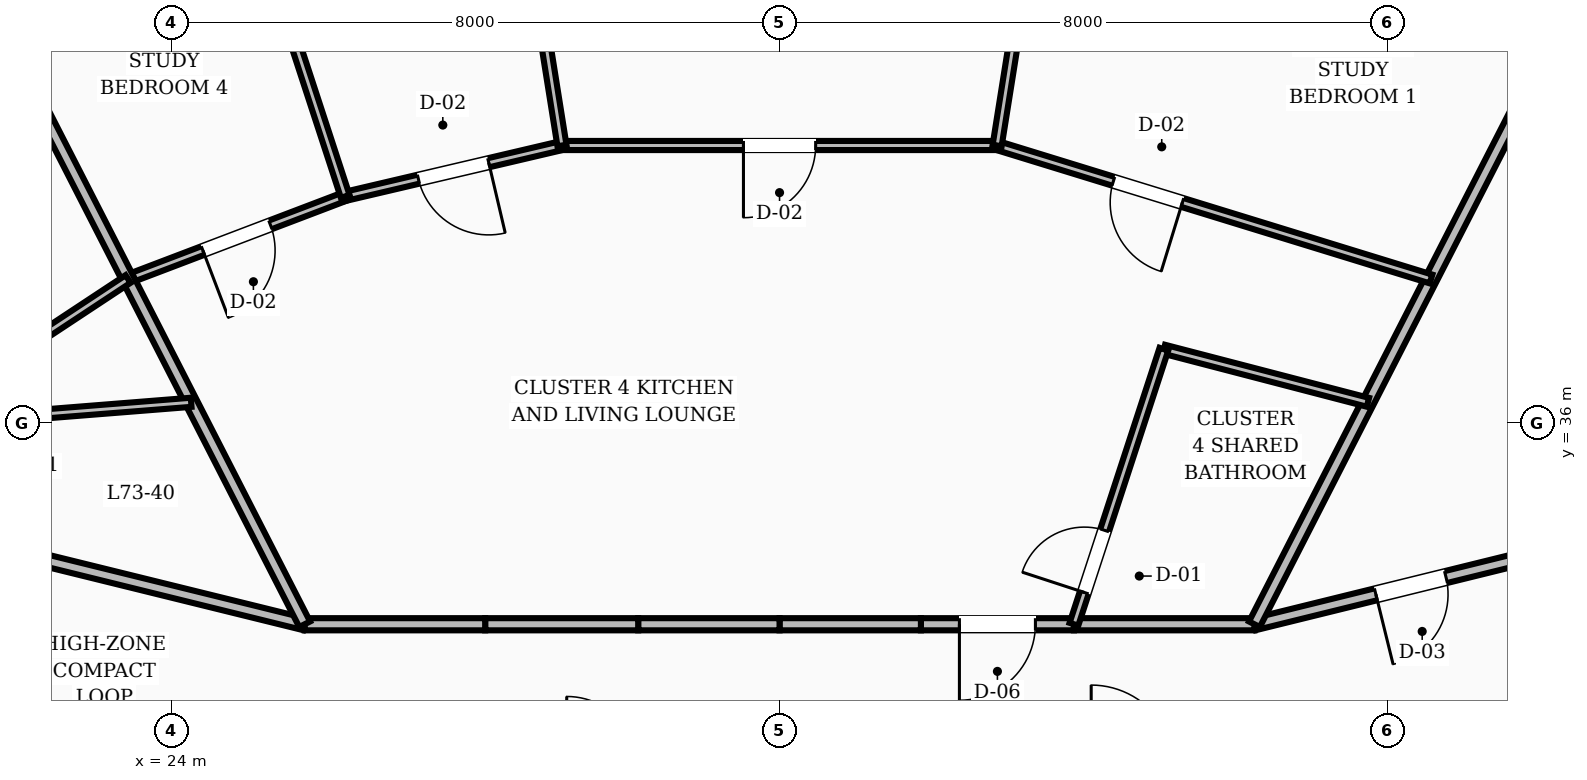
"""IFC4 building model, lengths in metres.
Left out: names, types, materials, properties, quantities, classifications, styles, units other than length and angle.
Written with IfcOpenShell. Run it as: python <this file> out.ifc"""

import sys

from ifc_helpers import new_model, si_unit, direction, frame, frame_2d, origin, place, context, subcontext, project, spatial, rectangle, extrude, element, fill, save


model = new_model("IFC4")
c1 = context("Model", 3, precision=1e-05, world=origin(), true_north=direction((0.0, 1.0)))
c2 = subcontext(c1, "Body", "Model", "MODEL_VIEW")
j1 = project(units=[si_unit("LENGTHUNIT", "METRE"), si_unit("PLANEANGLEUNIT", "RADIAN")], contexts=[c1])
p1 = place(None, origin())
s1 = spatial("IfcSite", under=j1, at=p1, CompositionType="ELEMENT")
p2 = place(p1, origin())
s2 = spatial("IfcBuilding", under=s1, at=p2, CompositionType="ELEMENT")
p3 = place(p2, frame((0.0, 0.0, 279.6)))
s3 = spatial("IfcBuildingStorey", under=s2, at=p3, CompositionType="ELEMENT", Elevation=279.6)
p4 = place(p3, frame((42.365, 34.365, 0.0), z_axis=(0.0, 0.0, 1.0), x_axis=(-0.970939799552, -0.239323850978, 0.0)))
e1 = element("IfcWall", 1, at=p4, inside=s3, PredefinedType="SOLIDWALL", context=c2, shape_type="SweptSolid", body=[
    extrude(rectangle(XDim=4.241, YDim=0.16, at=frame_2d((2.12, 0.0))), origin(), (0.0, 0.0, 1.0), 2.87),
])
p5 = place(p4, frame((1.646, 0.0, 0.0)))
e2 = element("IfcOpeningElement", 2, at=p5, cuts=e1, PredefinedType="OPENING", context=c2, shape_type="SweptSolid", body=[
    extrude(rectangle(XDim=0.95, YDim=2.1, at=frame_2d((0.475, 1.05))), frame((0.0, 0.09, 0.0), z_axis=(0.0, -1.0, 0.0), x_axis=(1.0, 0.0, 0.0)), (0.0, 0.0, 1.0), 0.18),
])
p6 = place(p3, frame((38.248, 33.35, 0.0), z_axis=(0.0, 0.0, 1.0), x_axis=(-1.0, 0.0, 0.0)))
e3 = element("IfcWall", 3, at=p6, inside=s3, PredefinedType="SOLIDWALL", context=c2, shape_type="SweptSolid", body=[
    extrude(rectangle(XDim=2.375, YDim=0.16, at=frame_2d((1.188, 0.0))), origin(), (0.0, 0.0, 1.0), 2.87),
])
p7 = place(p3, frame((35.873, 33.35, 0.0), z_axis=(0.0, 0.0, 1.0), x_axis=(-1.0, 0.0, 0.0)))
e4 = element("IfcWall", 4, at=p7, inside=s3, PredefinedType="SOLIDWALL", context=c2, shape_type="SweptSolid", body=[
    extrude(rectangle(XDim=2.013, YDim=0.16, at=frame_2d((1.006, 0.0))), origin(), (0.0, 0.0, 1.0), 2.87),
])
p8 = place(p7, frame((0.507, 0.0, 0.0)))
e5 = element("IfcOpeningElement", 5, at=p8, cuts=e4, PredefinedType="OPENING", context=c2, shape_type="SweptSolid", body=[
    extrude(rectangle(XDim=1.0, YDim=2.1, at=frame_2d((0.5, 1.05))), frame((0.0, 0.09, 0.0), z_axis=(0.0, -1.0, 0.0), x_axis=(1.0, 0.0, 0.0)), (0.0, 0.0, 1.0), 0.18),
])
for number, where, z_axis, x_axis in (
    (6, (33.86, 33.35, 0.0), (0.0, 0.0, 1.0), (-1.0, 0.0, 0.0)),
    (7, (32.0, 33.35, 0.0), (0.0, 0.0, 1.0), (-1.0, 0.0, 0.0)),
):
    element("IfcWall", number, at=place(p3, frame(where, z_axis=z_axis, x_axis=x_axis)), inside=s3, PredefinedType="SOLIDWALL", context=c2, shape_type="SweptSolid", body=[
        extrude(rectangle(XDim=1.86, YDim=0.16, at=frame_2d((0.93, 0.0))), origin(), (0.0, 0.0, 1.0), 2.87),
    ])
p9 = place(p3, frame((30.14, 33.35, 0.0), z_axis=(0.0, 0.0, 1.0), x_axis=(-1.0, 0.0, 0.0)))
e8 = element("IfcWall", 8, at=p9, inside=s3, PredefinedType="SOLIDWALL", context=c2, shape_type="SweptSolid", body=[
    extrude(rectangle(XDim=2.013, YDim=0.16, at=frame_2d((1.006, 0.0))), origin(), (0.0, 0.0, 1.0), 2.87),
])
p10 = place(p3, frame((28.127, 33.35, 0.0), z_axis=(0.0, 0.0, 1.0), x_axis=(-1.0, 0.0, 0.0)))
e9 = element("IfcWall", 9, at=p10, inside=s3, PredefinedType="SOLIDWALL", context=c2, shape_type="SweptSolid", body=[
    extrude(rectangle(XDim=2.375, YDim=0.16, at=frame_2d((1.188, 0.0))), origin(), (0.0, 0.0, 1.0), 2.87),
])
p11 = place(p3, frame((25.752, 33.35, 0.0), z_axis=(0.0, 0.0, 1.0), x_axis=(-0.970939799552, 0.239323850978, 0.0)))
e10 = element("IfcWall", 10, at=p11, inside=s3, PredefinedType="SOLIDWALL", context=c2, shape_type="SweptSolid", body=[
    extrude(rectangle(XDim=4.241, YDim=0.16, at=frame_2d((2.12, 0.0))), origin(), (0.0, 0.0, 1.0), 2.87),
])
p12 = place(p3, frame((38.248, 33.35, 0.0), z_axis=(0.0, 0.0, 1.0), x_axis=(0.455343199474, 0.890315994854, 0.0)))
e11 = element("IfcWall", 11, at=p12, inside=s3, PredefinedType="SOLIDWALL", context=c2, shape_type="SweptSolid", body=[
    extrude(rectangle(XDim=9.061, YDim=0.16, at=frame_2d((4.53, 0.0))), origin(), (0.0, 0.0, 1.0), 2.87),
])
p13 = place(p3, frame((39.741, 36.27, 0.0), z_axis=(0.0, 0.0, 1.0), x_axis=(-0.967751731416, 0.251905907714, 0.0)))
e12 = element("IfcWall", 12, at=p13, inside=s3, PredefinedType="PARTITIONING", context=c2, shape_type="SweptSolid", body=[
    extrude(rectangle(XDim=2.774, YDim=0.12, at=frame_2d((1.387, 0.0))), origin(), (0.0, 0.0, 1.0), 2.87),
])
p14 = place(p3, frame((35.873, 33.35, 0.0), z_axis=(0.0, 0.0, 1.0), x_axis=(0.310932697292, 0.950431932205, 0.0)))
e13 = element("IfcWall", 13, at=p14, inside=s3, PredefinedType="PARTITIONING", context=c2, shape_type="SweptSolid", body=[
    extrude(rectangle(XDim=3.807, YDim=0.12, at=frame_2d((1.904, 0.0))), origin(), (0.0, 0.0, 1.0), 2.87),
])
p15 = place(p14, frame((0.44, 0.0, 0.0)))
e14 = element("IfcOpeningElement", 14, at=p15, cuts=e13, PredefinedType="OPENING", context=c2, shape_type="SweptSolid", body=[
    extrude(rectangle(XDim=0.86, YDim=2.1, at=frame_2d((0.43, 1.05))), frame((0.0, 0.07, 0.0), z_axis=(0.0, -1.0, 0.0), x_axis=(1.0, 0.0, 0.0)), (0.0, 0.0, 1.0), 0.14),
])
p16 = place(p3, frame((40.571, 37.892, 0.0), z_axis=(0.0, 0.0, 1.0), x_axis=(-0.955788731156, 0.294054249068, 0.0)))
e15 = element("IfcWall", 15, at=p16, inside=s3, PredefinedType="PARTITIONING", context=c2, shape_type="SweptSolid", body=[
    extrude(rectangle(XDim=5.972, YDim=0.12, at=frame_2d((2.986, 0.0))), origin(), (0.0, 0.0, 1.0), 2.87),
])
p17 = place(p16, frame((3.422, 0.0, 0.0)))
e16 = element("IfcOpeningElement", 16, at=p17, cuts=e15, PredefinedType="OPENING", context=c2, shape_type="SweptSolid", body=[
    extrude(rectangle(XDim=0.95, YDim=2.1, at=frame_2d((0.475, 1.05))), frame((0.0, 0.07, 0.0), z_axis=(0.0, -1.0, 0.0), x_axis=(1.0, 0.0, 0.0)), (0.0, 0.0, 1.0), 0.14),
])
p18 = place(p3, frame((34.863, 39.648, 0.0), z_axis=(0.0, 0.0, 1.0), x_axis=(-1.0, 0.0, 0.0)))
e17 = element("IfcWall", 17, at=p18, inside=s3, PredefinedType="PARTITIONING", context=c2, shape_type="SweptSolid", body=[
    extrude(rectangle(XDim=5.726, YDim=0.12, at=frame_2d((2.863, 0.0))), origin(), (0.0, 0.0, 1.0), 2.87),
])
p19 = place(p18, frame((2.388, 0.0, 0.0)))
e18 = element("IfcOpeningElement", 18, at=p19, cuts=e17, PredefinedType="OPENING", context=c2, shape_type="SweptSolid", body=[
    extrude(rectangle(XDim=0.95, YDim=2.1, at=frame_2d((0.475, 1.05))), frame((0.0, 0.07, 0.0), z_axis=(0.0, -1.0, 0.0), x_axis=(1.0, 0.0, 0.0)), (0.0, 0.0, 1.0), 0.14),
])
p20 = place(p3, frame((34.863, 39.648, 0.0), z_axis=(0.0, 0.0, 1.0), x_axis=(0.157236134309, 0.98756103511, 0.0)))
e19 = element("IfcWall", 19, at=p20, inside=s3, PredefinedType="PARTITIONING", context=c2, shape_type="SweptSolid", body=[
    extrude(rectangle(XDim=4.961, YDim=0.12, at=frame_2d((2.48, 0.0))), origin(), (0.0, 0.0, 1.0), 2.87),
])
p21 = place(p3, frame((29.137, 39.648, 0.0), z_axis=(0.0, 0.0, 1.0), x_axis=(-0.973528560289, -0.228565400489, 0.0)))
e20 = element("IfcWall", 20, at=p21, inside=s3, PredefinedType="PARTITIONING", context=c2, shape_type="SweptSolid", body=[
    extrude(rectangle(XDim=2.929, YDim=0.12, at=frame_2d((1.464, 0.0))), origin(), (0.0, 0.0, 1.0), 2.87),
])
p22 = place(p21, frame((0.99, 0.0, 0.0)))
e21 = element("IfcOpeningElement", 21, at=p22, cuts=e20, PredefinedType="OPENING", context=c2, shape_type="SweptSolid", body=[
    extrude(rectangle(XDim=0.95, YDim=2.1, at=frame_2d((0.475, 1.05))), frame((0.0, 0.07, 0.0), z_axis=(0.0, -1.0, 0.0), x_axis=(1.0, 0.0, 0.0)), (0.0, 0.0, 1.0), 0.14),
])
p23 = place(p3, frame((29.137, 39.648, 0.0), z_axis=(0.0, 0.0, 1.0), x_axis=(-0.157236134309, 0.98756103511, 0.0)))
e22 = element("IfcWall", 22, at=p23, inside=s3, PredefinedType="PARTITIONING", context=c2, shape_type="SweptSolid", body=[
    extrude(rectangle(XDim=4.961, YDim=0.12, at=frame_2d((2.48, 0.0))), origin(), (0.0, 0.0, 1.0), 2.87),
])
p24 = place(p3, frame((26.286, 38.979, 0.0), z_axis=(0.0, 0.0, 1.0), x_axis=(-0.934660984689, -0.355540213901, 0.0)))
e23 = element("IfcWall", 23, at=p24, inside=s3, PredefinedType="PARTITIONING", context=c2, shape_type="SweptSolid", body=[
    extrude(rectangle(XDim=3.056, YDim=0.12, at=frame_2d((1.528, 0.0))), origin(), (0.0, 0.0, 1.0), 2.87),
])
p25 = place(p24, frame((1.053, 0.0, 0.0)))
e24 = element("IfcOpeningElement", 24, at=p25, cuts=e23, PredefinedType="OPENING", context=c2, shape_type="SweptSolid", body=[
    extrude(rectangle(XDim=0.95, YDim=2.1, at=frame_2d((0.475, 1.05))), frame((0.0, 0.07, 0.0), z_axis=(0.0, -1.0, 0.0), x_axis=(1.0, 0.0, 0.0)), (0.0, 0.0, 1.0), 0.14),
])
p26 = place(p3, frame((26.286, 38.979, 0.0), z_axis=(0.0, 0.0, 1.0), x_axis=(-0.310924966345, 0.95043446134, 0.0)))
e25 = element("IfcWall", 25, at=p26, inside=s3, PredefinedType="PARTITIONING", context=c2, shape_type="SweptSolid", body=[
    extrude(rectangle(XDim=4.604, YDim=0.12, at=frame_2d((2.302, 0.0))), origin(), (0.0, 0.0, 1.0), 2.87),
])
p27 = place(p3, frame((25.752, 33.35, 0.0), z_axis=(0.0, 0.0, 1.0), x_axis=(-0.455343199474, 0.890315994854, 0.0)))
e26 = element("IfcWall", 26, at=p27, inside=s3, PredefinedType="SOLIDWALL", context=c2, shape_type="SweptSolid", body=[
    extrude(rectangle(XDim=9.061, YDim=0.16, at=frame_2d((4.53, 0.0))), origin(), (0.0, 0.0, 1.0), 2.87),
])
p28 = place(p3, frame((24.259, 36.27, 0.0), z_axis=(0.0, 0.0, 1.0), x_axis=(-0.996857888432, -0.079210796423, 0.0)))
e27 = element("IfcWall", 27, at=p28, inside=s3, PredefinedType="PARTITIONING", context=c2, shape_type="SweptSolid", body=[
    extrude(rectangle(XDim=3.668, YDim=0.12, at=frame_2d((1.834, 0.0))), origin(), (0.0, 0.0, 1.0), 2.87),
])
p29 = place(p3, frame((23.429, 37.892, 0.0), z_axis=(0.0, 0.0, 1.0), x_axis=(-0.834428061238, -0.551116875643, 0.0)))
e28 = element("IfcWall", 28, at=p29, inside=s3, PredefinedType="PARTITIONING", context=c2, shape_type="SweptSolid", body=[
    extrude(rectangle(XDim=6.723, YDim=0.12, at=frame_2d((3.362, 0.0))), origin(), (0.0, 0.0, 1.0), 2.87),
])
p30 = place(p29, frame((3.963, 0.0, 0.0)))
e29 = element("IfcOpeningElement", 29, at=p30, cuts=e28, PredefinedType="OPENING", context=c2, shape_type="SweptSolid", body=[
    extrude(rectangle(XDim=0.95, YDim=2.1, at=frame_2d((0.475, 1.05))), frame((0.0, 0.07, 0.0), z_axis=(0.0, -1.0, 0.0), x_axis=(1.0, 0.0, 0.0)), (0.0, 0.0, 1.0), 0.14),
])
p31 = place(p5, origin())
e30 = element("IfcDoor", 30, at=p31, inside=s3, OperationType="SINGLE_SWING_RIGHT", PredefinedType="DOOR", context=c2, shape_type="SweptSolid", body=[
    extrude(rectangle(XDim=0.95, YDim=2.1, at=frame_2d((0.475, 1.05))), frame((0.0, 0.025, 0.0), z_axis=(0.0, -1.0, 0.0), x_axis=(1.0, 0.0, 0.0)), (0.0, 0.0, 1.0), 0.05),
])
fill(e2, e30)
p32 = place(p15, origin())
e31 = element("IfcDoor", 31, at=p32, inside=s3, OperationType="SINGLE_SWING_LEFT", PredefinedType="DOOR", context=c2, shape_type="SweptSolid", body=[
    extrude(rectangle(XDim=0.86, YDim=2.1, at=frame_2d((0.43, 1.05))), frame((0.0, 0.025, 0.0), z_axis=(0.0, -1.0, 0.0), x_axis=(1.0, 0.0, 0.0)), (0.0, 0.0, 1.0), 0.05),
])
fill(e14, e31)
p33 = place(p8, origin())
e32 = element("IfcDoor", 32, at=p33, inside=s3, OperationType="SINGLE_SWING_RIGHT", PredefinedType="DOOR", context=c2, shape_type="SweptSolid", body=[
    extrude(rectangle(XDim=1.0, YDim=2.1, at=frame_2d((0.5, 1.05))), frame((0.0, 0.025, 0.0), z_axis=(0.0, -1.0, 0.0), x_axis=(1.0, 0.0, 0.0)), (0.0, 0.0, 1.0), 0.05),
])
fill(e5, e32)
p34 = place(p17, origin())
e33 = element("IfcDoor", 33, at=p34, inside=s3, OperationType="SINGLE_SWING_LEFT", PredefinedType="DOOR", context=c2, shape_type="SweptSolid", body=[
    extrude(rectangle(XDim=0.95, YDim=2.1, at=frame_2d((0.475, 1.05))), frame((0.0, 0.025, 0.0), z_axis=(0.0, -1.0, 0.0), x_axis=(1.0, 0.0, 0.0)), (0.0, 0.0, 1.0), 0.05),
])
fill(e16, e33)
p35 = place(p19, origin())
e34 = element("IfcDoor", 34, at=p35, inside=s3, OperationType="SINGLE_SWING_RIGHT", PredefinedType="DOOR", context=c2, shape_type="SweptSolid", body=[
    extrude(rectangle(XDim=0.95, YDim=2.1, at=frame_2d((0.475, 1.05))), frame((0.0, 0.025, 0.0), z_axis=(0.0, -1.0, 0.0), x_axis=(1.0, 0.0, 0.0)), (0.0, 0.0, 1.0), 0.05),
])
fill(e18, e34)
p36 = place(p22, origin())
e35 = element("IfcDoor", 35, at=p36, inside=s3, OperationType="SINGLE_SWING_LEFT", PredefinedType="DOOR", context=c2, shape_type="SweptSolid", body=[
    extrude(rectangle(XDim=0.95, YDim=2.1, at=frame_2d((0.475, 1.05))), frame((0.0, 0.025, 0.0), z_axis=(0.0, -1.0, 0.0), x_axis=(1.0, 0.0, 0.0)), (0.0, 0.0, 1.0), 0.05),
])
fill(e21, e35)
p37 = place(p25, origin())
e36 = element("IfcDoor", 36, at=p37, inside=s3, OperationType="SINGLE_SWING_RIGHT", PredefinedType="DOOR", context=c2, shape_type="SweptSolid", body=[
    extrude(rectangle(XDim=0.95, YDim=2.1, at=frame_2d((0.475, 1.05))), frame((0.0, 0.025, 0.0), z_axis=(0.0, -1.0, 0.0), x_axis=(1.0, 0.0, 0.0)), (0.0, 0.0, 1.0), 0.05),
])
fill(e24, e36)
save(model, sys.argv[1])
